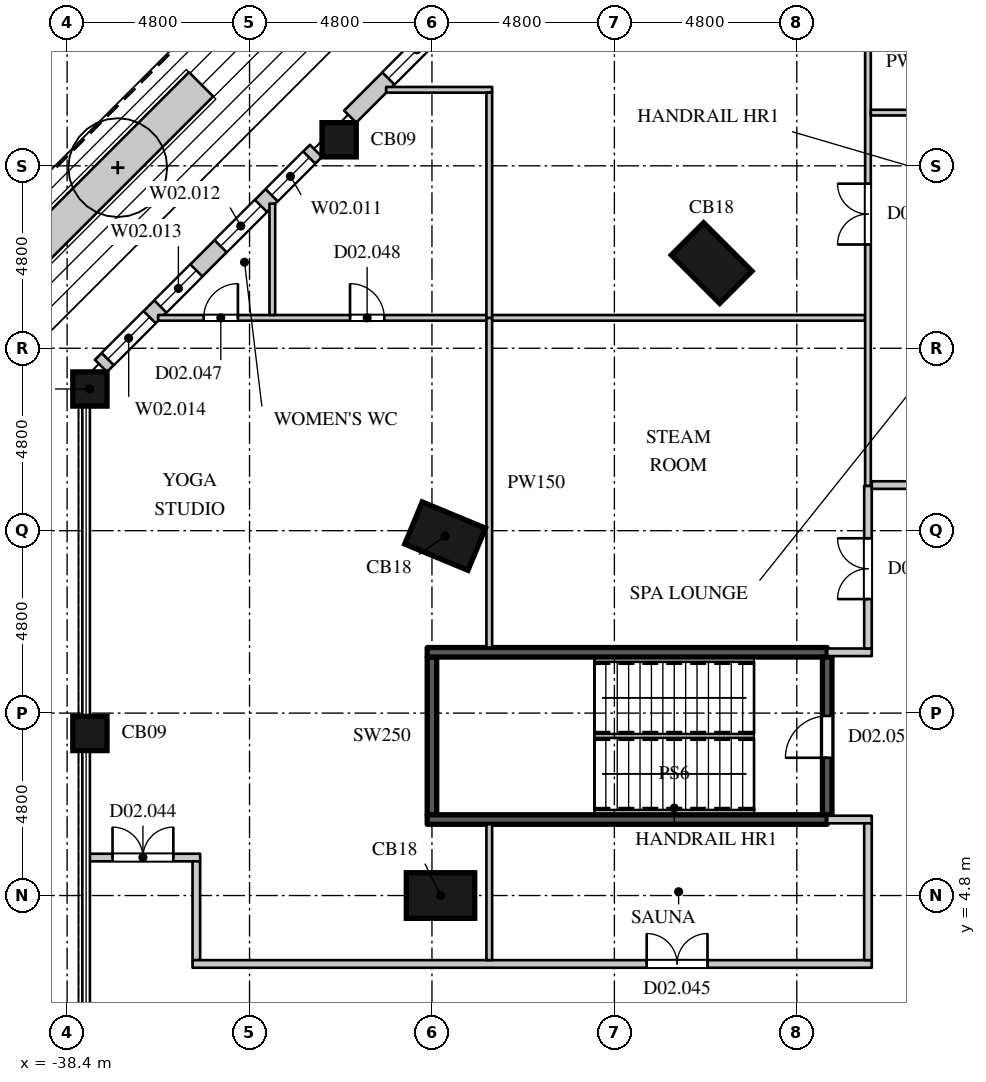
"""IFC4 building model, lengths in metres.
Left out: names, types, materials, properties, quantities, classifications, styles, units other than length and angle.
Written with IfcOpenShell. Run it as: python <this file> out.ifc"""

import sys

from ifc_helpers import new_model, si_unit, direction, frame, frame_2d, origin, origin_2d, place, context, subcontext, project, spatial, rectangle, extrude, element, fill, save


model = new_model("IFC4")
c1 = context("Model", 3, precision=1e-05, world=origin(), true_north=direction((0.0, 1.0)))
c2 = subcontext(c1, "Body", "Model", "MODEL_VIEW")
j1 = project(units=[si_unit("LENGTHUNIT", "METRE"), si_unit("PLANEANGLEUNIT", "RADIAN")], contexts=[c1])
p1 = place(None, origin())
s1 = spatial("IfcSite", under=j1, at=p1, CompositionType="ELEMENT")
p2 = place(p1, origin())
s2 = spatial("IfcBuilding", under=s1, at=p2, CompositionType="ELEMENT")
p3 = place(p2, frame((0.0, 0.0, 11.0)))
s3 = spatial("IfcBuildingStorey", under=s2, at=p3, CompositionType="ELEMENT", Elevation=11.0)
p4 = place(p3, frame((-28.575, 4.8, 0.0), z_axis=(0.0, 0.0, 1.0), x_axis=(0.0, -1.0, 0.0)))
e1 = element("IfcColumn", 1, at=p4, inside=s3, PredefinedType="COLUMN", context=c2, shape_type="SweptSolid", body=[
    extrude(rectangle(XDim=1.2, YDim=1.8, at=origin_2d()), origin(), (0.0, 0.0, 1.0), 5.0),
])
p5 = place(p3, frame((-37.8, 9.064, 0.0), z_axis=(0.0, 0.0, 1.0), x_axis=(1.0, 0.0, 0.0)))
e2 = element("IfcColumn", 2, at=p5, inside=s3, PredefinedType="COLUMN", context=c2, shape_type="SweptSolid", body=[
    extrude(rectangle(XDim=0.9, YDim=0.9, at=origin_2d()), origin(), (0.0, 0.0, 1.0), 5.0),
])
p6 = place(p3, frame((-28.454, 14.257, 0.0), z_axis=(0.0, 0.0, 1.0), x_axis=(-0.382683496864, -0.923879505795, 0.0)))
e3 = element("IfcColumn", 3, at=p6, inside=s3, PredefinedType="COLUMN", context=c2, shape_type="SweptSolid", body=[
    extrude(rectangle(XDim=1.2, YDim=1.8, at=origin_2d()), origin(), (0.0, 0.0, 1.0), 5.0),
])
p7 = place(p3, frame((-37.8, 18.128, 0.0), z_axis=(0.0, 0.0, 1.0), x_axis=(1.0, 0.0, 0.0)))
e4 = element("IfcColumn", 4, at=p7, inside=s3, PredefinedType="COLUMN", context=c2, shape_type="SweptSolid", body=[
    extrude(rectangle(XDim=0.9, YDim=0.9, at=origin_2d()), origin(), (0.0, 0.0, 1.0), 5.0),
])
p8 = place(p3, frame((-21.441, 21.441, 0.0), z_axis=(0.0, 0.0, 1.0), x_axis=(-0.707106781187, -0.707106781187, 0.0)))
e5 = element("IfcColumn", 5, at=p8, inside=s3, PredefinedType="COLUMN", context=c2, shape_type="SweptSolid", body=[
    extrude(rectangle(XDim=1.2, YDim=1.8, at=origin_2d()), origin(), (0.0, 0.0, 1.0), 5.0),
])
p9 = place(p3, frame((-31.243, 24.685, 0.0), z_axis=(0.0, 0.0, 1.0), x_axis=(1.0, 0.0, 0.0)))
e6 = element("IfcColumn", 6, at=p9, inside=s3, PredefinedType="COLUMN", context=c2, shape_type="SweptSolid", body=[
    extrude(rectangle(XDim=0.9, YDim=0.9, at=origin_2d()), origin(), (0.0, 0.0, 1.0), 5.0),
])
p10 = place(p3, frame((-25.294, 30.952, 0.0), z_axis=(0.0, 0.0, 1.0), x_axis=(-0.707106781187, -0.707106781187, 0.0)))
e7 = element("IfcWall", 7, at=p10, inside=s3, PredefinedType="ELEMENTEDWALL", context=c2, shape_type="SweptSolid", body=[
    extrude(rectangle(XDim=8.0, YDim=0.45, at=frame_2d((4.0, 0.0))), origin(), (0.0, 0.0, 1.0), 3.8),
])
p11 = place(p10, frame((0.25, 0.0, 1.05)))
e8 = element("IfcOpeningElement", 8, at=p11, cuts=e7, PredefinedType="OPENING", context=c2, shape_type="SweptSolid", body=[
    extrude(rectangle(XDim=3.3, YDim=2.7, at=frame_2d((1.65, 1.35))), frame((0.0, 0.235, 0.0), z_axis=(0.0, -1.0, 0.0), x_axis=(1.0, 0.0, 0.0)), (0.0, 0.0, 1.0), 0.47),
])
p12 = place(p10, frame((4.45, 0.0, 1.05)))
e9 = element("IfcOpeningElement", 9, at=p12, cuts=e7, PredefinedType="OPENING", context=c2, shape_type="SweptSolid", body=[
    extrude(rectangle(XDim=2.13, YDim=2.7, at=frame_2d((1.065, 1.35))), frame((0.0, 0.235, 0.0), z_axis=(0.0, -1.0, 0.0), x_axis=(1.0, 0.0, 0.0)), (0.0, 0.0, 1.0), 0.47),
])
p13 = place(p3, frame((-31.852, 24.394, 0.0), z_axis=(0.0, 0.0, 1.0), x_axis=(-0.707106781187, -0.707106781187, 0.0)))
e10 = element("IfcWall", 10, at=p13, inside=s3, PredefinedType="ELEMENTEDWALL", context=c2, shape_type="SweptSolid", body=[
    extrude(rectangle(XDim=8.0, YDim=0.45, at=frame_2d((4.0, 0.0))), origin(), (0.0, 0.0, 1.0), 3.8),
])
p14 = place(p13, frame((0.25, 0.0, 1.05)))
e11 = element("IfcOpeningElement", 11, at=p14, cuts=e10, PredefinedType="OPENING", context=c2, shape_type="SweptSolid", body=[
    extrude(rectangle(XDim=1.4, YDim=2.7, at=frame_2d((0.7, 1.35))), frame((0.0, 0.235, 0.0), z_axis=(0.0, -1.0, 0.0), x_axis=(1.0, 0.0, 0.0)), (0.0, 0.0, 1.0), 0.47),
])
p15 = place(p13, frame((2.049, 0.0, 1.05)))
e12 = element("IfcOpeningElement", 12, at=p15, cuts=e10, PredefinedType="OPENING", context=c2, shape_type="SweptSolid", body=[
    extrude(rectangle(XDim=1.5, YDim=2.7, at=frame_2d((0.75, 1.35))), frame((0.0, 0.235, 0.0), z_axis=(0.0, -1.0, 0.0), x_axis=(1.0, 0.0, 0.0)), (0.0, 0.0, 1.0), 0.47),
])
p16 = place(p13, frame((4.45, 0.0, 1.05)))
e13 = element("IfcOpeningElement", 13, at=p16, cuts=e10, PredefinedType="OPENING", context=c2, shape_type="SweptSolid", body=[
    extrude(rectangle(XDim=1.34, YDim=2.7, at=frame_2d((0.67, 1.35))), frame((0.0, 0.235, 0.0), z_axis=(0.0, -1.0, 0.0), x_axis=(1.0, 0.0, 0.0)), (0.0, 0.0, 1.0), 0.47),
])
p17 = place(p13, frame((6.19, 0.0, 1.05)))
e14 = element("IfcOpeningElement", 14, at=p17, cuts=e10, PredefinedType="OPENING", context=c2, shape_type="SweptSolid", body=[
    extrude(rectangle(XDim=1.56, YDim=2.7, at=frame_2d((0.78, 1.35))), frame((0.0, 0.235, 0.0), z_axis=(0.0, -1.0, 0.0), x_axis=(1.0, 0.0, 0.0)), (0.0, 0.0, 1.0), 0.47),
])
p18 = place(p3, frame((-34.875, 26.145, 0.0), z_axis=(0.0, 0.0, 1.0), x_axis=(-0.707126467061, -0.707087094764, 0.0)))
e15 = element("IfcWall", 15, at=p18, inside=s3, PredefinedType="USERDEFINED", context=c2, shape_type="SweptSolid", body=[
    extrude(rectangle(XDim=6.201, YDim=0.9, at=frame_2d((3.101, 0.0))), origin(), (0.0, 0.0, 1.0), 0.9),
])
p19 = place(p3, frame((-37.855, 5.8, 0.0), z_axis=(0.0, 0.0, 1.0), x_axis=(1.0, 0.0, 0.0)))
e16 = element("IfcWall", 16, at=p19, inside=s3, PredefinedType="PARTITIONING", context=c2, shape_type="SweptSolid", body=[
    extrude(rectangle(XDim=2.955, YDim=0.2, at=frame_2d((1.478, 0.0))), origin(), (0.0, 0.0, 1.0), 4.65),
])
p20 = place(p19, frame((0.65, 0.0, 0.0)))
e17 = element("IfcOpeningElement", 17, at=p20, cuts=e16, PredefinedType="OPENING", context=c2, shape_type="SweptSolid", body=[
    extrude(rectangle(XDim=1.6, YDim=2.4, at=frame_2d((0.8, 1.2))), frame((0.0, 0.11, 0.0), z_axis=(0.0, -1.0, 0.0), x_axis=(1.0, 0.0, 0.0)), (0.0, 0.0, 1.0), 0.22),
])
p21 = place(p3, frame((-35.0, 3.1, 0.0), z_axis=(0.0, 0.0, 1.0), x_axis=(0.0, 1.0, 0.0)))
e18 = element("IfcWall", 18, at=p21, inside=s3, PredefinedType="PARTITIONING", context=c2, shape_type="SweptSolid", body=[
    extrude(rectangle(XDim=2.6, YDim=0.2, at=frame_2d((1.3, 0.0))), origin(), (0.0, 0.0, 1.0), 4.65),
])
p22 = place(p3, frame((-35.1, 3.0, 0.0), z_axis=(0.0, 0.0, 1.0), x_axis=(1.0, 0.0, 0.0)))
e19 = element("IfcWall", 19, at=p22, inside=s3, PredefinedType="PARTITIONING", context=c2, shape_type="SweptSolid", body=[
    extrude(rectangle(XDim=17.872, YDim=0.2, at=frame_2d((8.936, 0.0))), origin(), (0.0, 0.0, 1.0), 4.65),
])
p23 = place(p22, frame((11.95, 0.0, 0.0)))
e20 = element("IfcOpeningElement", 20, at=p23, cuts=e19, PredefinedType="OPENING", context=c2, shape_type="SweptSolid", body=[
    extrude(rectangle(XDim=1.6, YDim=2.4, at=frame_2d((0.8, 1.2))), frame((0.0, 0.11, 0.0), z_axis=(0.0, -1.0, 0.0), x_axis=(1.0, 0.0, 0.0)), (0.0, 0.0, 1.0), 0.22),
])
for number, where, z_axis, x_axis in (
    (21, (-18.4, 6.8, 0.0), (0.0, 0.0, 1.0), (1.0, 0.0, 0.0)),
    (22, (-18.4, 11.2, 0.0), (0.0, 0.0, 1.0), (1.0, 0.0, 0.0)),
):
    element("IfcWall", number, at=place(p3, frame(where, z_axis=z_axis, x_axis=x_axis)), inside=s3, PredefinedType="PARTITIONING", context=c2, shape_type="SweptSolid", body=[
        extrude(rectangle(XDim=1.172, YDim=0.2, at=frame_2d((0.586, 0.0))), origin(), (0.0, 0.0, 1.0), 4.65),
    ])
p24 = place(p3, frame((-17.328, 3.1, 0.0), z_axis=(0.0, 0.0, 1.0), x_axis=(0.0, 1.0, 0.0)))
e23 = element("IfcWall", 23, at=p24, inside=s3, PredefinedType="PARTITIONING", context=c2, shape_type="SweptSolid", body=[
    extrude(rectangle(XDim=3.6, YDim=0.2, at=frame_2d((1.8, 0.0))), origin(), (0.0, 0.0, 1.0), 4.65),
])
p25 = place(p3, frame((-17.328, 11.3, 0.0), z_axis=(0.0, 0.0, 1.0), x_axis=(0.0, 1.0, 0.0)))
e24 = element("IfcWall", 24, at=p25, inside=s3, PredefinedType="PARTITIONING", context=c2, shape_type="SweptSolid", body=[
    extrude(rectangle(XDim=4.28, YDim=0.2, at=frame_2d((2.14, 0.0))), origin(), (0.0, 0.0, 1.0), 4.65),
])
p26 = place(p25, frame((1.3, 0.0, 0.0)))
e25 = element("IfcOpeningElement", 25, at=p26, cuts=e24, PredefinedType="OPENING", context=c2, shape_type="SweptSolid", body=[
    extrude(rectangle(XDim=1.6, YDim=2.4, at=frame_2d((0.8, 1.2))), frame((0.0, 0.11, 0.0), z_axis=(0.0, -1.0, 0.0), x_axis=(1.0, 0.0, 0.0)), (0.0, 0.0, 1.0), 0.22),
])
p27 = place(p3, frame((-17.228, 15.6, 0.0), z_axis=(0.0, 0.0, 1.0), x_axis=(1.0, 0.0, 0.0)))
e26 = element("IfcWall", 26, at=p27, inside=s3, PredefinedType="PARTITIONING", context=c2, shape_type="SweptSolid", body=[
    extrude(rectangle(XDim=6.128, YDim=0.2, at=frame_2d((3.064, 0.0))), origin(), (0.0, 0.0, 1.0), 4.65),
])
p28 = place(p27, frame((2.25, 0.0, 0.0)))
e27 = element("IfcOpeningElement", 27, at=p28, cuts=e26, PredefinedType="OPENING", context=c2, shape_type="SweptSolid", body=[
    extrude(rectangle(XDim=1.6, YDim=2.4, at=frame_2d((0.8, 1.2))), frame((0.0, 0.11, 0.0), z_axis=(0.0, -1.0, 0.0), x_axis=(1.0, 0.0, 0.0)), (0.0, 0.0, 1.0), 0.22),
])
p29 = place(p3, frame((-36.006, 20.0, 0.0), z_axis=(0.0, 0.0, 1.0), x_axis=(1.0, 0.0, 0.0)))
e28 = element("IfcWall", 28, at=p29, inside=s3, PredefinedType="PARTITIONING", context=c2, shape_type="SweptSolid", body=[
    extrude(rectangle(XDim=18.603, YDim=0.15, at=frame_2d((9.301, 0.0))), origin(), (0.0, 0.0, 1.0), 4.65),
])
p30 = place(p29, frame((1.2, 0.0, 0.0)))
e29 = element("IfcOpeningElement", 29, at=p30, cuts=e28, PredefinedType="OPENING", context=c2, shape_type="SweptSolid", body=[
    extrude(rectangle(XDim=0.9, YDim=2.2, at=frame_2d((0.45, 1.1))), frame((0.0, 0.085, 0.0), z_axis=(0.0, -1.0, 0.0), x_axis=(1.0, 0.0, 0.0)), (0.0, 0.0, 1.0), 0.17),
])
p31 = place(p29, frame((5.05, 0.0, 0.0)))
e30 = element("IfcOpeningElement", 30, at=p31, cuts=e28, PredefinedType="OPENING", context=c2, shape_type="SweptSolid", body=[
    extrude(rectangle(XDim=0.9, YDim=2.2, at=frame_2d((0.45, 1.1))), frame((0.0, 0.085, 0.0), z_axis=(0.0, -1.0, 0.0), x_axis=(1.0, 0.0, 0.0)), (0.0, 0.0, 1.0), 0.17),
])
p32 = place(p3, frame((-33.0, 20.075, 0.0), z_axis=(0.0, 0.0, 1.0), x_axis=(0.0, 1.0, 0.0)))
e31 = element("IfcWall", 31, at=p32, inside=s3, PredefinedType="PARTITIONING", context=c2, shape_type="SweptSolid", body=[
    extrude(rectangle(XDim=2.931, YDim=0.15, at=frame_2d((1.465, 0.0))), origin(), (0.0, 0.0, 1.0), 4.65),
])
p33 = place(p3, frame((-30.006, 26.0, 0.0), z_axis=(0.0, 0.0, 1.0), x_axis=(1.0, 0.0, 0.0)))
e32 = element("IfcWall", 32, at=p33, inside=s3, PredefinedType="PARTITIONING", context=c2, shape_type="SweptSolid", body=[
    extrude(rectangle(XDim=2.789, YDim=0.15, at=frame_2d((1.395, 0.0))), origin(), (0.0, 0.0, 1.0), 4.65),
])
p34 = place(p3, frame((-27.292, 3.1, 0.0), z_axis=(0.0, 0.0, 1.0), x_axis=(0.0, 1.0, 0.0)))
e33 = element("IfcWall", 33, at=p34, inside=s3, PredefinedType="PARTITIONING", context=c2, shape_type="SweptSolid", body=[
    extrude(rectangle(XDim=3.575, YDim=0.15, at=frame_2d((1.788, 0.0))), origin(), (0.0, 0.0, 1.0), 4.65),
])
p35 = place(p3, frame((-27.292, 11.325, 0.0), z_axis=(0.0, 0.0, 1.0), x_axis=(0.0, 1.0, 0.0)))
e34 = element("IfcWall", 34, at=p35, inside=s3, PredefinedType="PARTITIONING", context=c2, shape_type="SweptSolid", body=[
    extrude(rectangle(XDim=8.675, YDim=0.15, at=frame_2d((4.337, 0.0))), origin(), (0.0, 0.0, 1.0), 4.65),
])
p36 = place(p3, frame((-27.292, 20.0, 0.0), z_axis=(0.0, 0.0, 1.0), x_axis=(0.0, 1.0, 0.0)))
e35 = element("IfcWall", 35, at=p36, inside=s3, PredefinedType="PARTITIONING", context=c2, shape_type="SweptSolid", body=[
    extrude(rectangle(XDim=5.925, YDim=0.15, at=frame_2d((2.962, 0.0))), origin(), (0.0, 0.0, 1.0), 4.65),
])
p37 = place(p3, frame((-17.328, 15.58, 0.0), z_axis=(0.0, 0.0, 1.0), x_axis=(0.0, 1.0, 0.0)))
e36 = element("IfcWall", 36, at=p37, inside=s3, PredefinedType="PARTITIONING", context=c2, shape_type="SweptSolid", body=[
    extrude(rectangle(XDim=22.275, YDim=0.15, at=frame_2d((11.137, 0.0))), origin(), (0.0, 0.0, 1.0), 4.65),
])
p38 = place(p37, frame((12.8, 0.0, 0.0)))
e37 = element("IfcOpeningElement", 37, at=p38, cuts=e36, PredefinedType="OPENING", context=c2, shape_type="SweptSolid", body=[
    extrude(rectangle(XDim=1.6, YDim=2.4, at=frame_2d((0.8, 1.2))), frame((0.0, 0.085, 0.0), z_axis=(0.0, -1.0, 0.0), x_axis=(1.0, 0.0, 0.0)), (0.0, 0.0, 1.0), 0.17),
])
p39 = place(p37, frame((6.35, 0.0, 0.0)))
e38 = element("IfcOpeningElement", 38, at=p39, cuts=e36, PredefinedType="OPENING", context=c2, shape_type="SweptSolid", body=[
    extrude(rectangle(XDim=1.6, YDim=2.4, at=frame_2d((0.8, 1.2))), frame((0.0, 0.085, 0.0), z_axis=(0.0, -1.0, 0.0), x_axis=(1.0, 0.0, 0.0)), (0.0, 0.0, 1.0), 0.17),
])
p40 = place(p3, frame((-17.253, 25.4, 0.0), z_axis=(0.0, 0.0, 1.0), x_axis=(1.0, 0.0, 0.0)))
e39 = element("IfcWall", 39, at=p40, inside=s3, PredefinedType="PARTITIONING", context=c2, shape_type="SweptSolid", body=[
    extrude(rectangle(XDim=5.928, YDim=0.15, at=frame_2d((2.964, 0.0))), origin(), (0.0, 0.0, 1.0), 4.65),
])
p41 = place(p3, frame((-28.8, 6.925, 0.0), z_axis=(0.0, 0.0, 1.0), x_axis=(0.0, 1.0, 0.0)))
e40 = element("IfcWall", 40, at=p41, inside=s3, PredefinedType="SHEAR", context=c2, shape_type="SweptSolid", body=[
    extrude(rectangle(XDim=4.15, YDim=0.25, at=frame_2d((2.075, 0.0))), origin(), (0.0, 0.0, 1.0), 4.65),
])
for number, where, z_axis, x_axis in (
    (41, (-28.925, 6.8, 0.0), (0.0, 0.0, 1.0), (1.0, 0.0, 0.0)),
    (42, (-28.925, 11.2, 0.0), (0.0, 0.0, 1.0), (1.0, 0.0, 0.0)),
):
    element("IfcWall", number, at=place(p3, frame(where, z_axis=z_axis, x_axis=x_axis)), inside=s3, PredefinedType="SHEAR", context=c2, shape_type="SweptSolid", body=[
        extrude(rectangle(XDim=10.525, YDim=0.25, at=frame_2d((5.263, 0.0))), origin(), (0.0, 0.0, 1.0), 4.65),
    ])
p42 = place(p3, frame((-18.4, 6.925, 0.0), z_axis=(0.0, 0.0, 1.0), x_axis=(0.0, 1.0, 0.0)))
e43 = element("IfcWall", 43, at=p42, inside=s3, PredefinedType="SHEAR", context=c2, shape_type="SweptSolid", body=[
    extrude(rectangle(XDim=4.15, YDim=0.25, at=frame_2d((2.075, 0.0))), origin(), (0.0, 0.0, 1.0), 4.65),
])
p43 = place(p42, frame((1.5, 0.0, 0.0)))
e44 = element("IfcOpeningElement", 44, at=p43, cuts=e43, PredefinedType="OPENING", context=c2, shape_type="SweptSolid", body=[
    extrude(rectangle(XDim=1.1, YDim=2.2, at=frame_2d((0.55, 1.1))), frame((0.0, 0.135, 0.0), z_axis=(0.0, -1.0, 0.0), x_axis=(1.0, 0.0, 0.0)), (0.0, 0.0, 1.0), 0.27),
])
p44 = place(p12, origin())
e45 = element("IfcWindow", 45, at=p44, inside=s3, PartitioningType="SINGLE_PANEL", PredefinedType="WINDOW", context=c2, shape_type="SweptSolid", body=[
    extrude(rectangle(XDim=2.13, YDim=2.7, at=frame_2d((1.065, 1.35))), frame((0.0, 0.135, 0.0), z_axis=(0.0, -1.0, 0.0), x_axis=(1.0, 0.0, 0.0)), (0.0, 0.0, 1.0), 0.06),
])
fill(e9, e45)
p45 = place(p14, origin())
e46 = element("IfcWindow", 46, at=p45, inside=s3, PartitioningType="SINGLE_PANEL", PredefinedType="WINDOW", context=c2, shape_type="SweptSolid", body=[
    extrude(rectangle(XDim=1.4, YDim=2.7, at=frame_2d((0.7, 1.35))), frame((0.0, 0.135, 0.0), z_axis=(0.0, -1.0, 0.0), x_axis=(1.0, 0.0, 0.0)), (0.0, 0.0, 1.0), 0.06),
])
fill(e11, e46)
p46 = place(p15, origin())
e47 = element("IfcWindow", 47, at=p46, inside=s3, PartitioningType="SINGLE_PANEL", PredefinedType="WINDOW", context=c2, shape_type="SweptSolid", body=[
    extrude(rectangle(XDim=1.5, YDim=2.7, at=frame_2d((0.75, 1.35))), frame((0.0, 0.135, 0.0), z_axis=(0.0, -1.0, 0.0), x_axis=(1.0, 0.0, 0.0)), (0.0, 0.0, 1.0), 0.06),
])
fill(e12, e47)
p47 = place(p16, origin())
e48 = element("IfcWindow", 48, at=p47, inside=s3, PartitioningType="SINGLE_PANEL", PredefinedType="WINDOW", context=c2, shape_type="SweptSolid", body=[
    extrude(rectangle(XDim=1.34, YDim=2.7, at=frame_2d((0.67, 1.35))), frame((0.0, 0.135, 0.0), z_axis=(0.0, -1.0, 0.0), x_axis=(1.0, 0.0, 0.0)), (0.0, 0.0, 1.0), 0.06),
])
fill(e13, e48)
p48 = place(p17, origin())
e49 = element("IfcWindow", 49, at=p48, inside=s3, PartitioningType="SINGLE_PANEL", PredefinedType="WINDOW", context=c2, shape_type="SweptSolid", body=[
    extrude(rectangle(XDim=1.56, YDim=2.7, at=frame_2d((0.78, 1.35))), frame((0.0, 0.135, 0.0), z_axis=(0.0, -1.0, 0.0), x_axis=(1.0, 0.0, 0.0)), (0.0, 0.0, 1.0), 0.06),
])
fill(e14, e49)
p49 = place(p20, origin())
e50 = element("IfcDoor", 50, at=p49, inside=s3, OperationType="DOUBLE_DOOR_SINGLE_SWING", PredefinedType="DOOR", context=c2, shape_type="SweptSolid", body=[
    extrude(rectangle(XDim=1.6, YDim=2.4, at=frame_2d((0.8, 1.2))), frame((0.0, 0.025, 0.0), z_axis=(0.0, -1.0, 0.0), x_axis=(1.0, 0.0, 0.0)), (0.0, 0.0, 1.0), 0.05),
])
fill(e17, e50)
p50 = place(p23, origin())
e51 = element("IfcDoor", 51, at=p50, inside=s3, OperationType="DOUBLE_DOOR_SINGLE_SWING", PredefinedType="DOOR", context=c2, shape_type="SweptSolid", body=[
    extrude(rectangle(XDim=1.6, YDim=2.4, at=frame_2d((0.8, 1.2))), frame((0.0, 0.025, 0.0), z_axis=(0.0, -1.0, 0.0), x_axis=(1.0, 0.0, 0.0)), (0.0, 0.0, 1.0), 0.05),
])
fill(e20, e51)
p51 = place(p26, origin())
e52 = element("IfcDoor", 52, at=p51, inside=s3, OperationType="DOUBLE_DOOR_SINGLE_SWING", PredefinedType="DOOR", context=c2, shape_type="SweptSolid", body=[
    extrude(rectangle(XDim=1.6, YDim=2.4, at=frame_2d((0.8, 1.2))), frame((0.0, 0.025, 0.0), z_axis=(0.0, -1.0, 0.0), x_axis=(1.0, 0.0, 0.0)), (0.0, 0.0, 1.0), 0.05),
])
fill(e25, e52)
p52 = place(p30, origin())
e53 = element("IfcDoor", 53, at=p52, inside=s3, OperationType="SINGLE_SWING_RIGHT", PredefinedType="DOOR", context=c2, shape_type="SweptSolid", body=[
    extrude(rectangle(XDim=0.9, YDim=2.2, at=frame_2d((0.45, 1.1))), frame((0.0, 0.025, 0.0), z_axis=(0.0, -1.0, 0.0), x_axis=(1.0, 0.0, 0.0)), (0.0, 0.0, 1.0), 0.05),
])
fill(e29, e53)
p53 = place(p31, origin())
e54 = element("IfcDoor", 54, at=p53, inside=s3, OperationType="SINGLE_SWING_LEFT", PredefinedType="DOOR", context=c2, shape_type="SweptSolid", body=[
    extrude(rectangle(XDim=0.9, YDim=2.2, at=frame_2d((0.45, 1.1))), frame((0.0, 0.025, 0.0), z_axis=(0.0, -1.0, 0.0), x_axis=(1.0, 0.0, 0.0)), (0.0, 0.0, 1.0), 0.05),
])
fill(e30, e54)
p54 = place(p39, origin())
e55 = element("IfcDoor", 55, at=p54, inside=s3, OperationType="DOUBLE_DOOR_SINGLE_SWING", PredefinedType="DOOR", context=c2, shape_type="SweptSolid", body=[
    extrude(rectangle(XDim=1.6, YDim=2.4, at=frame_2d((0.8, 1.2))), frame((0.0, 0.025, 0.0), z_axis=(0.0, -1.0, 0.0), x_axis=(1.0, 0.0, 0.0)), (0.0, 0.0, 1.0), 0.05),
])
fill(e38, e55)
p55 = place(p43, origin())
e56 = element("IfcDoor", 56, at=p55, inside=s3, OperationType="SINGLE_SWING_LEFT", PredefinedType="DOOR", context=c2, shape_type="SweptSolid", body=[
    extrude(rectangle(XDim=1.1, YDim=2.2, at=frame_2d((0.55, 1.1))), frame((0.0, 0.025, 0.0), z_axis=(0.0, -1.0, 0.0), x_axis=(1.0, 0.0, 0.0)), (0.0, 0.0, 1.0), 0.05),
])
fill(e44, e56)
save(model, sys.argv[1])
